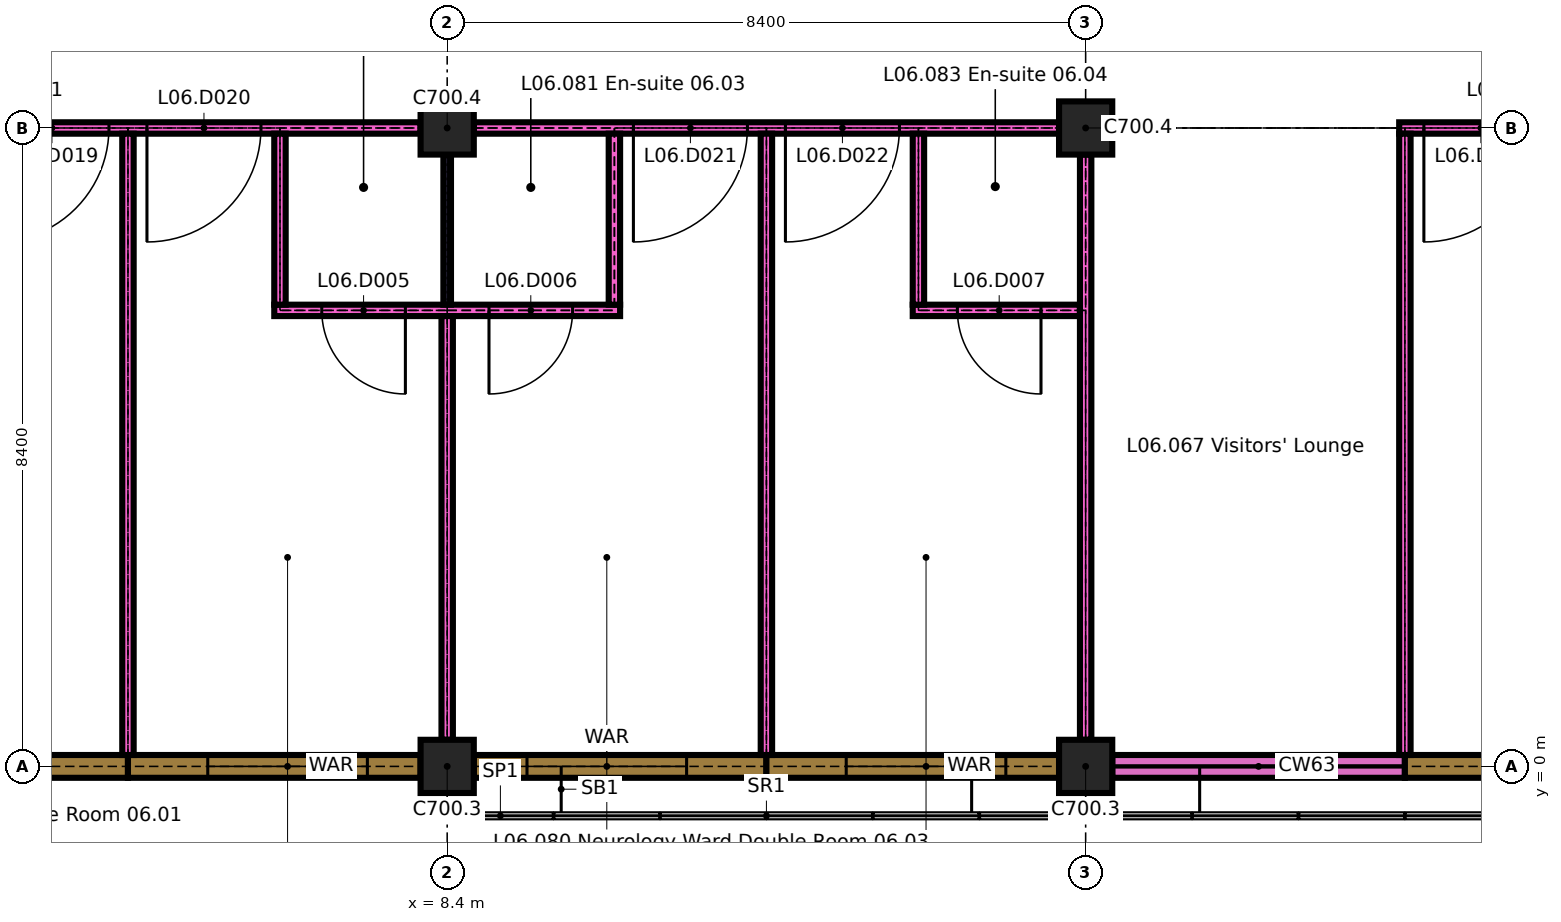
"""IFC4 building model, lengths in metres.
Left out: names, types, materials, properties, quantities, classifications, styles, units other than length and angle.
Written with IfcOpenShell. Run it as: python <this file> out.ifc"""

import sys

from ifc_helpers import new_model, si_unit, direction, frame, frame_2d, origin, origin_2d, place, context, subcontext, project, spatial, rectangle, extrude, element, fill, save


model = new_model("IFC4")
c1 = context("Model", 3, precision=1e-05, world=origin(), true_north=direction((0.0, 1.0)))
c2 = subcontext(c1, "Body", "Model", "MODEL_VIEW")
j1 = project(units=[si_unit("LENGTHUNIT", "METRE"), si_unit("PLANEANGLEUNIT", "RADIAN")], contexts=[c1])
p1 = place(None, origin())
s1 = spatial("IfcSite", under=j1, at=p1, CompositionType="ELEMENT")
p2 = place(p1, origin())
s2 = spatial("IfcBuilding", under=s1, at=p2, CompositionType="ELEMENT")
p3 = place(p2, frame((0.0, 0.0, 26.1)))
s3 = spatial("IfcBuildingStorey", under=s2, at=p3, CompositionType="ELEMENT", Elevation=26.1)
for number, where, z_axis, x_axis in (
    (1, (8.4, 0.0, 0.0), (0.0, 0.0, 1.0), (1.0, 0.0, 0.0)),
    (2, (16.8, 0.0, 0.0), (0.0, 0.0, 1.0), (1.0, 0.0, 0.0)),
):
    element("IfcColumn", number, at=place(p3, frame(where, z_axis=z_axis, x_axis=x_axis)), inside=s3, PredefinedType="COLUMN", context=c2, shape_type="SweptSolid", body=[
        extrude(rectangle(XDim=0.7, YDim=0.7, at=origin_2d()), origin(), (0.0, 0.0, 1.0), 3.2),
    ])
for number, where, z_axis, x_axis in (
    (3, (8.4, 8.4, 0.0), (0.0, 0.0, 1.0), (1.0, 0.0, 0.0)),
    (4, (16.8, 8.4, 0.0), (0.0, 0.0, 1.0), (1.0, 0.0, 0.0)),
):
    element("IfcColumn", number, at=place(p3, frame(where, z_axis=z_axis, x_axis=x_axis)), inside=s3, PredefinedType="COLUMN", context=c2, shape_type="SweptSolid", body=[
        extrude(rectangle(XDim=0.7, YDim=0.7, at=origin_2d()), origin(), (0.0, 0.0, 1.0), 3.3),
    ])
p4 = place(p3, frame((0.35, 0.0, 0.0), z_axis=(0.0, 0.0, 1.0), x_axis=(1.0, 0.0, 0.0)))
e5 = element("IfcWall", 5, at=p4, inside=s3, PredefinedType="SOLIDWALL", context=c2, shape_type="SweptSolid", body=[
    extrude(rectangle(XDim=3.85, YDim=0.3, at=frame_2d((1.925, 0.0))), origin(), (0.0, 0.0, 1.0), 2.9),
])
p5 = place(p4, frame((0.7, 0.0, 0.9)))
e6 = element("IfcOpeningElement", 6, at=p5, cuts=e5, PredefinedType="OPENING", context=c2, shape_type="SweptSolid", body=[
    extrude(rectangle(XDim=2.1, YDim=1.5, at=frame_2d((1.05, 0.75))), frame((0.0, 0.16, 0.0), z_axis=(0.0, -1.0, 0.0), x_axis=(1.0, 0.0, 0.0)), (0.0, 0.0, 1.0), 0.32),
])
p6 = place(p3, frame((4.2, 0.0, 0.0), z_axis=(0.0, 0.0, 1.0), x_axis=(1.0, 0.0, 0.0)))
e7 = element("IfcWall", 7, at=p6, inside=s3, PredefinedType="SOLIDWALL", context=c2, shape_type="SweptSolid", body=[
    extrude(rectangle(XDim=3.85, YDim=0.3, at=frame_2d((1.925, 0.0))), origin(), (0.0, 0.0, 1.0), 2.9),
])
p7 = place(p6, frame((1.05, 0.0, 0.9)))
e8 = element("IfcOpeningElement", 8, at=p7, cuts=e7, PredefinedType="OPENING", context=c2, shape_type="SweptSolid", body=[
    extrude(rectangle(XDim=2.1, YDim=1.5, at=frame_2d((1.05, 0.75))), frame((0.0, 0.16, 0.0), z_axis=(0.0, -1.0, 0.0), x_axis=(1.0, 0.0, 0.0)), (0.0, 0.0, 1.0), 0.32),
])
p8 = place(p3, frame((8.75, 0.0, 0.0), z_axis=(0.0, 0.0, 1.0), x_axis=(1.0, 0.0, 0.0)))
e9 = element("IfcWall", 9, at=p8, inside=s3, PredefinedType="SOLIDWALL", context=c2, shape_type="SweptSolid", body=[
    extrude(rectangle(XDim=3.85, YDim=0.3, at=frame_2d((1.925, 0.0))), origin(), (0.0, 0.0, 1.0), 2.9),
])
p9 = place(p8, frame((0.7, 0.0, 0.9)))
e10 = element("IfcOpeningElement", 10, at=p9, cuts=e9, PredefinedType="OPENING", context=c2, shape_type="SweptSolid", body=[
    extrude(rectangle(XDim=2.1, YDim=1.5, at=frame_2d((1.05, 0.75))), frame((0.0, 0.16, 0.0), z_axis=(0.0, -1.0, 0.0), x_axis=(1.0, 0.0, 0.0)), (0.0, 0.0, 1.0), 0.32),
])
p10 = place(p3, frame((12.6, 0.0, 0.0), z_axis=(0.0, 0.0, 1.0), x_axis=(1.0, 0.0, 0.0)))
e11 = element("IfcWall", 11, at=p10, inside=s3, PredefinedType="SOLIDWALL", context=c2, shape_type="SweptSolid", body=[
    extrude(rectangle(XDim=3.85, YDim=0.3, at=frame_2d((1.925, 0.0))), origin(), (0.0, 0.0, 1.0), 2.9),
])
p11 = place(p10, frame((1.05, 0.0, 0.9)))
e12 = element("IfcOpeningElement", 12, at=p11, cuts=e11, PredefinedType="OPENING", context=c2, shape_type="SweptSolid", body=[
    extrude(rectangle(XDim=2.1, YDim=1.5, at=frame_2d((1.05, 0.75))), frame((0.0, 0.16, 0.0), z_axis=(0.0, -1.0, 0.0), x_axis=(1.0, 0.0, 0.0)), (0.0, 0.0, 1.0), 0.32),
])
p12 = place(p3, frame((17.15, 0.0, 0.0), z_axis=(0.0, 0.0, 1.0), x_axis=(1.0, 0.0, 0.0)))
e13 = element("IfcWall", 13, at=p12, inside=s3, PredefinedType="SOLIDWALL", context=c2, shape_type="SweptSolid", body=[
    extrude(rectangle(XDim=3.85, YDim=0.3, at=frame_2d((1.925, 0.0))), origin(), (0.0, 0.0, 1.0), 0.6),
])
p13 = place(p3, frame((21.0, 0.0, 0.0), z_axis=(0.0, 0.0, 1.0), x_axis=(1.0, 0.0, 0.0)))
e14 = element("IfcWall", 14, at=p13, inside=s3, PredefinedType="SOLIDWALL", context=c2, shape_type="SweptSolid", body=[
    extrude(rectangle(XDim=3.85, YDim=0.3, at=frame_2d((1.925, 0.0))), origin(), (0.0, 0.0, 1.0), 2.9),
])
p14 = place(p13, frame((1.05, 0.0, 0.9)))
e15 = element("IfcOpeningElement", 15, at=p14, cuts=e14, PredefinedType="OPENING", context=c2, shape_type="SweptSolid", body=[
    extrude(rectangle(XDim=2.1, YDim=1.5, at=frame_2d((1.05, 0.75))), frame((0.0, 0.16, 0.0), z_axis=(0.0, -1.0, 0.0), x_axis=(1.0, 0.0, 0.0)), (0.0, 0.0, 1.0), 0.32),
])
p15 = place(p3, frame((6.125, 6.0, 0.0), z_axis=(0.0, 0.0, 1.0), x_axis=(1.0, 0.0, 0.0)))
e16 = element("IfcWall", 16, at=p15, inside=s3, PredefinedType="PARTITIONING", context=c2, shape_type="SweptSolid", body=[
    extrude(rectangle(XDim=4.55, YDim=0.15, at=frame_2d((2.275, 0.0))), origin(), (0.0, 0.0, 1.0), 3.3),
])
p16 = place(p15, frame((0.625, 0.0, 0.0)))
e17 = element("IfcOpeningElement", 17, at=p16, cuts=e16, PredefinedType="OPENING", context=c2, shape_type="SweptSolid", body=[
    extrude(rectangle(XDim=1.1, YDim=2.1, at=frame_2d((0.55, 1.05))), frame((0.0, 0.085, 0.0), z_axis=(0.0, -1.0, 0.0), x_axis=(1.0, 0.0, 0.0)), (0.0, 0.0, 1.0), 0.17),
])
p17 = place(p15, frame((2.825, 0.0, 0.0)))
e18 = element("IfcOpeningElement", 18, at=p17, cuts=e16, PredefinedType="OPENING", context=c2, shape_type="SweptSolid", body=[
    extrude(rectangle(XDim=1.1, YDim=2.1, at=frame_2d((0.55, 1.05))), frame((0.0, 0.085, 0.0), z_axis=(0.0, -1.0, 0.0), x_axis=(1.0, 0.0, 0.0)), (0.0, 0.0, 1.0), 0.17),
])
p18 = place(p3, frame((14.525, 6.0, 0.0), z_axis=(0.0, 0.0, 1.0), x_axis=(1.0, 0.0, 0.0)))
e19 = element("IfcWall", 19, at=p18, inside=s3, PredefinedType="PARTITIONING", context=c2, shape_type="SweptSolid", body=[
    extrude(rectangle(XDim=2.2, YDim=0.15, at=frame_2d((1.1, 0.0))), origin(), (0.0, 0.0, 1.0), 3.3),
])
p19 = place(p18, frame((0.587, 0.0, 0.0)))
e20 = element("IfcOpeningElement", 20, at=p19, cuts=e19, PredefinedType="OPENING", context=c2, shape_type="SweptSolid", body=[
    extrude(rectangle(XDim=1.1, YDim=2.1, at=frame_2d((0.55, 1.05))), frame((0.0, 0.085, 0.0), z_axis=(0.0, -1.0, 0.0), x_axis=(1.0, 0.0, 0.0)), (0.0, 0.0, 1.0), 0.17),
])
p20 = place(p3, frame((0.35, 8.4, 0.0), z_axis=(0.0, 0.0, 1.0), x_axis=(1.0, 0.0, 0.0)))
e21 = element("IfcWall", 21, at=p20, inside=s3, PredefinedType="PARTITIONING", context=c2, shape_type="SweptSolid", body=[
    extrude(rectangle(XDim=7.7, YDim=0.15, at=frame_2d((3.85, 0.0))), origin(), (0.0, 0.0, 1.0), 3.3),
])
p21 = place(p20, frame((2.1, 0.0, 0.0)))
e22 = element("IfcOpeningElement", 22, at=p21, cuts=e21, PredefinedType="OPENING", context=c2, shape_type="SweptSolid", body=[
    extrude(rectangle(XDim=1.5, YDim=2.4, at=frame_2d((0.75, 1.2))), frame((0.0, 0.085, 0.0), z_axis=(0.0, -1.0, 0.0), x_axis=(1.0, 0.0, 0.0)), (0.0, 0.0, 1.0), 0.17),
])
p22 = place(p20, frame((4.1, 0.0, 0.0)))
e23 = element("IfcOpeningElement", 23, at=p22, cuts=e21, PredefinedType="OPENING", context=c2, shape_type="SweptSolid", body=[
    extrude(rectangle(XDim=1.5, YDim=2.4, at=frame_2d((0.75, 1.2))), frame((0.0, 0.085, 0.0), z_axis=(0.0, -1.0, 0.0), x_axis=(1.0, 0.0, 0.0)), (0.0, 0.0, 1.0), 0.17),
])
p23 = place(p3, frame((8.75, 8.4, 0.0), z_axis=(0.0, 0.0, 1.0), x_axis=(1.0, 0.0, 0.0)))
e24 = element("IfcWall", 24, at=p23, inside=s3, PredefinedType="PARTITIONING", context=c2, shape_type="SweptSolid", body=[
    extrude(rectangle(XDim=7.7, YDim=0.15, at=frame_2d((3.85, 0.0))), origin(), (0.0, 0.0, 1.0), 3.3),
])
p24 = place(p23, frame((2.1, 0.0, 0.0)))
e25 = element("IfcOpeningElement", 25, at=p24, cuts=e24, PredefinedType="OPENING", context=c2, shape_type="SweptSolid", body=[
    extrude(rectangle(XDim=1.5, YDim=2.4, at=frame_2d((0.75, 1.2))), frame((0.0, 0.085, 0.0), z_axis=(0.0, -1.0, 0.0), x_axis=(1.0, 0.0, 0.0)), (0.0, 0.0, 1.0), 0.17),
])
p25 = place(p23, frame((4.1, 0.0, 0.0)))
e26 = element("IfcOpeningElement", 26, at=p25, cuts=e24, PredefinedType="OPENING", context=c2, shape_type="SweptSolid", body=[
    extrude(rectangle(XDim=1.5, YDim=2.4, at=frame_2d((0.75, 1.2))), frame((0.0, 0.085, 0.0), z_axis=(0.0, -1.0, 0.0), x_axis=(1.0, 0.0, 0.0)), (0.0, 0.0, 1.0), 0.17),
])
p26 = place(p3, frame((20.925, 8.4, 0.0), z_axis=(0.0, 0.0, 1.0), x_axis=(1.0, 0.0, 0.0)))
e27 = element("IfcWall", 27, at=p26, inside=s3, PredefinedType="PARTITIONING", context=c2, shape_type="SweptSolid", body=[
    extrude(rectangle(XDim=3.925, YDim=0.15, at=frame_2d((1.962, 0.0))), origin(), (0.0, 0.0, 1.0), 3.3),
])
p27 = place(p26, frame((0.325, 0.0, 0.0)))
e28 = element("IfcOpeningElement", 28, at=p27, cuts=e27, PredefinedType="OPENING", context=c2, shape_type="SweptSolid", body=[
    extrude(rectangle(XDim=1.5, YDim=2.4, at=frame_2d((0.75, 1.2))), frame((0.0, 0.085, 0.0), z_axis=(0.0, -1.0, 0.0), x_axis=(1.0, 0.0, 0.0)), (0.0, 0.0, 1.0), 0.17),
])
p28 = place(p3, frame((4.2, 0.15, 0.0), z_axis=(0.0, 0.0, 1.0), x_axis=(0.0, 1.0, 0.0)))
e29 = element("IfcWall", 29, at=p28, inside=s3, PredefinedType="PARTITIONING", context=c2, shape_type="SweptSolid", body=[
    extrude(rectangle(XDim=8.175, YDim=0.15, at=frame_2d((4.087, 0.0))), origin(), (0.0, 0.0, 1.0), 3.3),
])
p29 = place(p3, frame((6.2, 6.075, 0.0), z_axis=(0.0, 0.0, 1.0), x_axis=(0.0, 1.0, 0.0)))
e30 = element("IfcWall", 30, at=p29, inside=s3, PredefinedType="PARTITIONING", context=c2, shape_type="SweptSolid", body=[
    extrude(rectangle(XDim=2.25, YDim=0.15, at=frame_2d((1.125, 0.0))), origin(), (0.0, 0.0, 1.0), 3.3),
])
p30 = place(p3, frame((8.4, 0.35, 0.0), z_axis=(0.0, 0.0, 1.0), x_axis=(0.0, 1.0, 0.0)))
e31 = element("IfcWall", 31, at=p30, inside=s3, PredefinedType="PARTITIONING", context=c2, shape_type="SweptSolid", body=[
    extrude(rectangle(XDim=5.575, YDim=0.15, at=frame_2d((2.788, 0.0))), origin(), (0.0, 0.0, 1.0), 3.3),
])
p31 = place(p3, frame((8.4, 6.075, 0.0), z_axis=(0.0, 0.0, 1.0), x_axis=(0.0, 1.0, 0.0)))
e32 = element("IfcWall", 32, at=p31, inside=s3, PredefinedType="PARTITIONING", context=c2, shape_type="SweptSolid", body=[
    extrude(rectangle(XDim=1.975, YDim=0.1, at=frame_2d((0.988, 0.0))), origin(), (0.0, 0.0, 1.0), 3.3),
])
p32 = place(p3, frame((10.6, 6.075, 0.0), z_axis=(0.0, 0.0, 1.0), x_axis=(0.0, 1.0, 0.0)))
e33 = element("IfcWall", 33, at=p32, inside=s3, PredefinedType="PARTITIONING", context=c2, shape_type="SweptSolid", body=[
    extrude(rectangle(XDim=2.25, YDim=0.15, at=frame_2d((1.125, 0.0))), origin(), (0.0, 0.0, 1.0), 3.3),
])
p33 = place(p3, frame((12.6, 0.15, 0.0), z_axis=(0.0, 0.0, 1.0), x_axis=(0.0, 1.0, 0.0)))
e34 = element("IfcWall", 34, at=p33, inside=s3, PredefinedType="PARTITIONING", context=c2, shape_type="SweptSolid", body=[
    extrude(rectangle(XDim=8.175, YDim=0.15, at=frame_2d((4.087, 0.0))), origin(), (0.0, 0.0, 1.0), 3.3),
])
p34 = place(p3, frame((14.6, 6.075, 0.0), z_axis=(0.0, 0.0, 1.0), x_axis=(0.0, 1.0, 0.0)))
e35 = element("IfcWall", 35, at=p34, inside=s3, PredefinedType="PARTITIONING", context=c2, shape_type="SweptSolid", body=[
    extrude(rectangle(XDim=2.25, YDim=0.15, at=frame_2d((1.125, 0.0))), origin(), (0.0, 0.0, 1.0), 3.3),
])
p35 = place(p3, frame((16.8, 0.35, 0.0), z_axis=(0.0, 0.0, 1.0), x_axis=(0.0, 1.0, 0.0)))
e36 = element("IfcWall", 36, at=p35, inside=s3, PredefinedType="PARTITIONING", context=c2, shape_type="SweptSolid", body=[
    extrude(rectangle(XDim=7.7, YDim=0.15, at=frame_2d((3.85, 0.0))), origin(), (0.0, 0.0, 1.0), 3.3),
])
p36 = place(p3, frame((21.0, 0.15, 0.0), z_axis=(0.0, 0.0, 1.0), x_axis=(0.0, 1.0, 0.0)))
e37 = element("IfcWall", 37, at=p36, inside=s3, PredefinedType="PARTITIONING", context=c2, shape_type="SweptSolid", body=[
    extrude(rectangle(XDim=8.175, YDim=0.15, at=frame_2d((4.087, 0.0))), origin(), (0.0, 0.0, 1.0), 3.3),
])
p37 = place(p7, origin())
e38 = element("IfcWindow", 38, at=p37, inside=s3, PartitioningType="DOUBLE_PANEL_VERTICAL", PredefinedType="WINDOW", context=c2, shape_type="SweptSolid", body=[
    extrude(rectangle(XDim=2.1, YDim=1.5, at=frame_2d((1.05, 0.75))), frame((0.0, 0.05, 0.0), z_axis=(0.0, -1.0, 0.0), x_axis=(1.0, 0.0, 0.0)), (0.0, 0.0, 1.0), 0.1),
])
fill(e8, e38)
p38 = place(p9, origin())
e39 = element("IfcWindow", 39, at=p38, inside=s3, PartitioningType="DOUBLE_PANEL_VERTICAL", PredefinedType="WINDOW", context=c2, shape_type="SweptSolid", body=[
    extrude(rectangle(XDim=2.1, YDim=1.5, at=frame_2d((1.05, 0.75))), frame((0.0, 0.05, 0.0), z_axis=(0.0, -1.0, 0.0), x_axis=(1.0, 0.0, 0.0)), (0.0, 0.0, 1.0), 0.1),
])
fill(e10, e39)
p39 = place(p11, origin())
e40 = element("IfcWindow", 40, at=p39, inside=s3, PartitioningType="DOUBLE_PANEL_VERTICAL", PredefinedType="WINDOW", context=c2, shape_type="SweptSolid", body=[
    extrude(rectangle(XDim=2.1, YDim=1.5, at=frame_2d((1.05, 0.75))), frame((0.0, 0.05, 0.0), z_axis=(0.0, -1.0, 0.0), x_axis=(1.0, 0.0, 0.0)), (0.0, 0.0, 1.0), 0.1),
])
fill(e12, e40)
p40 = place(p16, origin())
e41 = element("IfcDoor", 41, at=p40, inside=s3, OperationType="SINGLE_SWING_RIGHT", PredefinedType="DOOR", context=c2, shape_type="SweptSolid", body=[
    extrude(rectangle(XDim=1.1, YDim=2.1, at=frame_2d((0.55, 1.05))), frame((0.0, 0.025, 0.0), z_axis=(0.0, -1.0, 0.0), x_axis=(1.0, 0.0, 0.0)), (0.0, 0.0, 1.0), 0.05),
])
fill(e17, e41)
p41 = place(p17, origin())
e42 = element("IfcDoor", 42, at=p41, inside=s3, OperationType="SINGLE_SWING_LEFT", PredefinedType="DOOR", context=c2, shape_type="SweptSolid", body=[
    extrude(rectangle(XDim=1.1, YDim=2.1, at=frame_2d((0.55, 1.05))), frame((0.0, 0.025, 0.0), z_axis=(0.0, -1.0, 0.0), x_axis=(1.0, 0.0, 0.0)), (0.0, 0.0, 1.0), 0.05),
])
fill(e18, e42)
p42 = place(p19, origin())
e43 = element("IfcDoor", 43, at=p42, inside=s3, OperationType="SINGLE_SWING_RIGHT", PredefinedType="DOOR", context=c2, shape_type="SweptSolid", body=[
    extrude(rectangle(XDim=1.1, YDim=2.1, at=frame_2d((0.55, 1.05))), frame((0.0, 0.025, 0.0), z_axis=(0.0, -1.0, 0.0), x_axis=(1.0, 0.0, 0.0)), (0.0, 0.0, 1.0), 0.05),
])
fill(e20, e43)
p43 = place(p21, origin())
e44 = element("IfcDoor", 44, at=p43, inside=s3, OperationType="SINGLE_SWING_LEFT", PredefinedType="DOOR", context=c2, shape_type="SweptSolid", body=[
    extrude(rectangle(XDim=1.5, YDim=2.4, at=frame_2d((0.75, 1.2))), frame((0.0, 0.03, 0.0), z_axis=(0.0, -1.0, 0.0), x_axis=(1.0, 0.0, 0.0)), (0.0, 0.0, 1.0), 0.06),
])
fill(e22, e44)
p44 = place(p22, origin())
e45 = element("IfcDoor", 45, at=p44, inside=s3, OperationType="SINGLE_SWING_LEFT", PredefinedType="DOOR", context=c2, shape_type="SweptSolid", body=[
    extrude(rectangle(XDim=1.5, YDim=2.4, at=frame_2d((0.75, 1.2))), frame((0.0, 0.03, 0.0), z_axis=(0.0, -1.0, 0.0), x_axis=(1.0, 0.0, 0.0)), (0.0, 0.0, 1.0), 0.06),
])
fill(e23, e45)
p45 = place(p24, origin())
e46 = element("IfcDoor", 46, at=p45, inside=s3, OperationType="SINGLE_SWING_LEFT", PredefinedType="DOOR", context=c2, shape_type="SweptSolid", body=[
    extrude(rectangle(XDim=1.5, YDim=2.4, at=frame_2d((0.75, 1.2))), frame((0.0, 0.03, 0.0), z_axis=(0.0, -1.0, 0.0), x_axis=(1.0, 0.0, 0.0)), (0.0, 0.0, 1.0), 0.06),
])
fill(e25, e46)
p46 = place(p25, origin())
e47 = element("IfcDoor", 47, at=p46, inside=s3, OperationType="SINGLE_SWING_LEFT", PredefinedType="DOOR", context=c2, shape_type="SweptSolid", body=[
    extrude(rectangle(XDim=1.5, YDim=2.4, at=frame_2d((0.75, 1.2))), frame((0.0, 0.03, 0.0), z_axis=(0.0, -1.0, 0.0), x_axis=(1.0, 0.0, 0.0)), (0.0, 0.0, 1.0), 0.06),
])
fill(e26, e47)
p47 = place(p27, origin())
e48 = element("IfcDoor", 48, at=p47, inside=s3, OperationType="SINGLE_SWING_LEFT", PredefinedType="DOOR", context=c2, shape_type="SweptSolid", body=[
    extrude(rectangle(XDim=1.5, YDim=2.4, at=frame_2d((0.75, 1.2))), frame((0.0, 0.03, 0.0), z_axis=(0.0, -1.0, 0.0), x_axis=(1.0, 0.0, 0.0)), (0.0, 0.0, 1.0), 0.06),
])
fill(e28, e48)
save(model, sys.argv[1])
